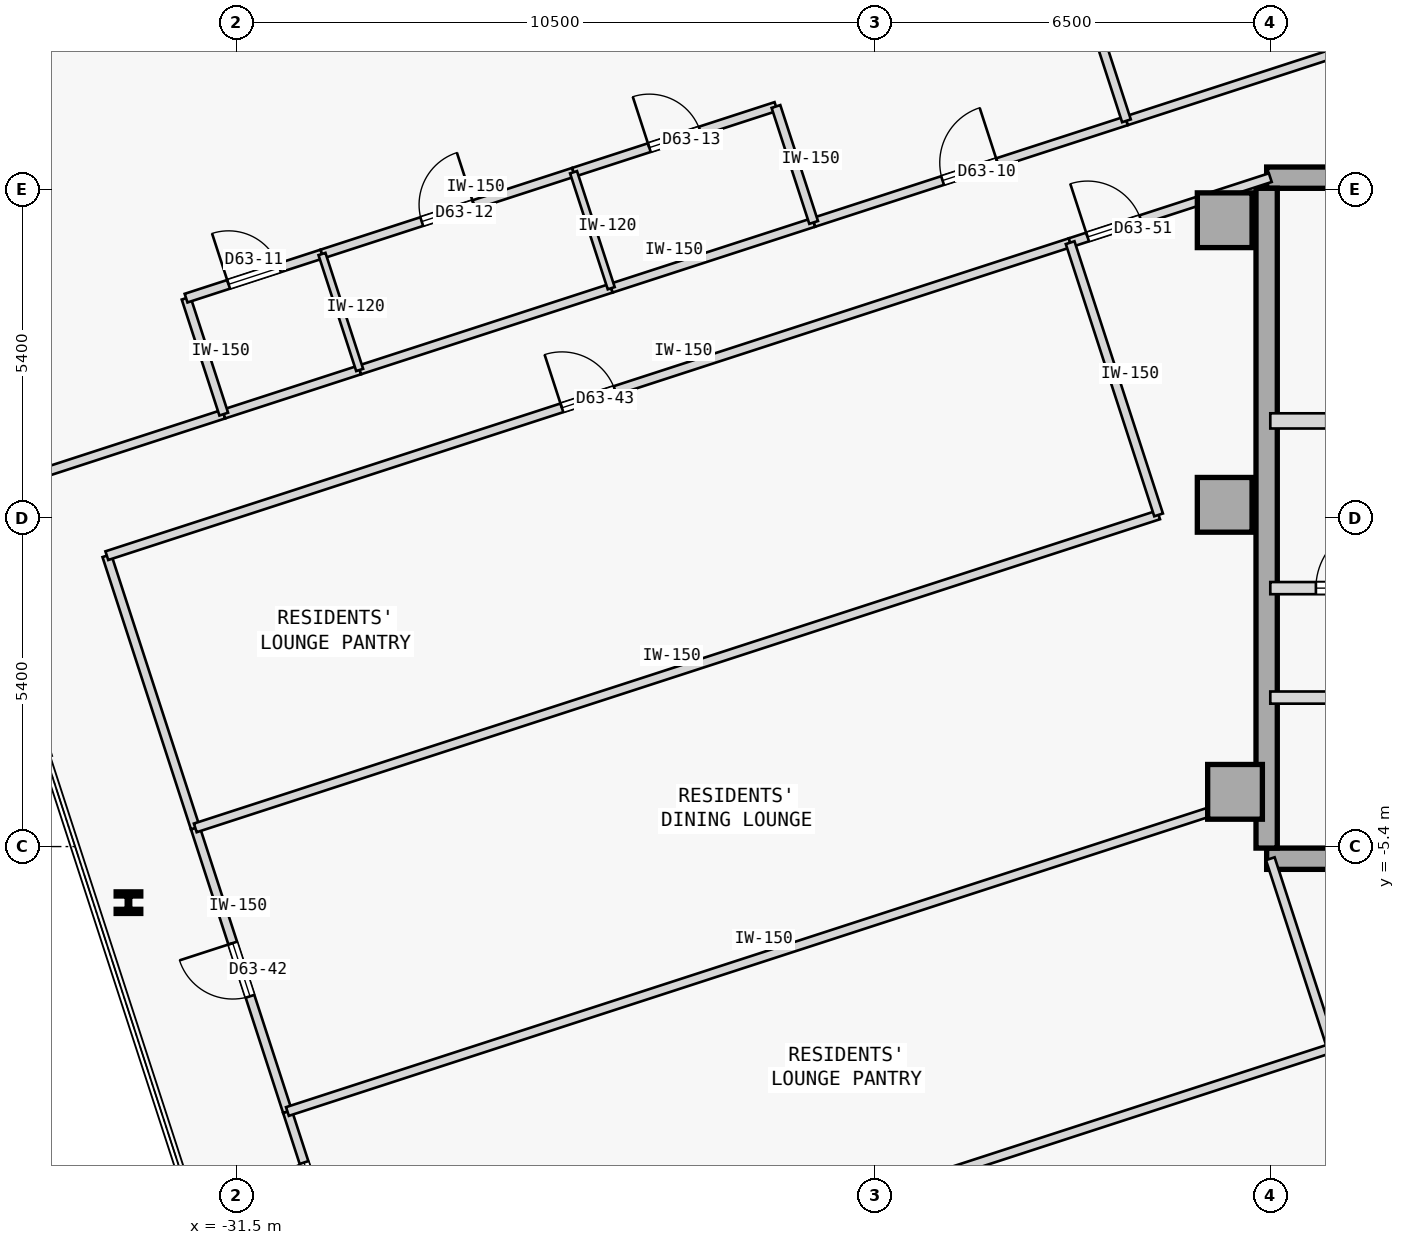
"""IFC4 building model, lengths in metres.
Left out: names, types, materials, properties, quantities, classifications, styles, units other than length and angle.
Written with IfcOpenShell. Run it as: python <this file> out.ifc"""

import sys

from ifc_helpers import new_model, si_unit, direction, frame, frame_2d, origin, origin_2d, place, context, subcontext, project, spatial, rectangle, i_section, extrude, element, fill, save


model = new_model("IFC4")
c1 = context("Model", 3, precision=1e-05, world=origin(), true_north=direction((0.0, 1.0)))
c2 = subcontext(c1, "Body", "Model", "MODEL_VIEW")
j1 = project(units=[si_unit("LENGTHUNIT", "METRE"), si_unit("PLANEANGLEUNIT", "RADIAN")], contexts=[c1])
p1 = place(None, origin())
s1 = spatial("IfcSite", under=j1, at=p1, CompositionType="ELEMENT")
p2 = place(p1, origin())
s2 = spatial("IfcBuilding", under=s1, at=p2, CompositionType="ELEMENT")
p3 = place(p2, frame((0.0, 0.0, 237.7)))
s3 = spatial("IfcBuildingStorey", under=s2, at=p3, CompositionType="ELEMENT", Elevation=237.7)
for number, where, z_axis, x_axis in (
    (1, (-15.25, 4.9, 0.0), (0.0, 0.0, 1.0), (1.0, 0.0, 0.0)),
    (2, (-15.25, 0.22, 0.0), (0.0, 0.0, 1.0), (1.0, 0.0, 0.0)),
    (3, (-15.08, -4.5, 0.0), (0.0, 0.0, 1.0), (1.0, 0.0, 0.0)),
):
    element("IfcColumn", number, at=place(p3, frame(where, z_axis=z_axis, x_axis=x_axis)), inside=s3, PredefinedType="COLUMN", context=c2, shape_type="SweptSolid", body=[
        extrude(rectangle(XDim=0.9, YDim=0.9, at=origin_2d()), origin(), (0.0, 0.0, 1.0), 3.35),
    ])
p4 = place(p3, frame((-14.56, 5.6, 0.0), z_axis=(0.0, 0.0, 1.0), x_axis=(1.0, 0.0, 0.0)))
e4 = element("IfcWall", 4, at=p4, inside=s3, PredefinedType="SHEAR", context=c2, shape_type="SweptSolid", body=[
    extrude(rectangle(XDim=11.41, YDim=0.35, at=frame_2d((5.705, 0.0))), origin(), (0.0, 0.0, 1.0), 3.125),
])
p5 = place(p3, frame((-14.56, -5.6, 0.0), z_axis=(0.0, 0.0, 1.0), x_axis=(1.0, 0.0, 0.0)))
e5 = element("IfcWall", 5, at=p5, inside=s3, PredefinedType="SHEAR", context=c2, shape_type="SweptSolid", body=[
    extrude(rectangle(XDim=10.86, YDim=0.35, at=frame_2d((5.43, 0.0))), origin(), (0.0, 0.0, 1.0), 3.125),
])
p6 = place(p3, frame((-14.56, -5.425, 0.0), z_axis=(0.0, 0.0, 1.0), x_axis=(0.0, 1.0, 0.0)))
e6 = element("IfcWall", 6, at=p6, inside=s3, PredefinedType="SHEAR", context=c2, shape_type="SweptSolid", body=[
    extrude(rectangle(XDim=10.85, YDim=0.35, at=frame_2d((5.425, 0.0))), origin(), (0.0, 0.0, 1.0), 3.125),
])
p7 = place(p3, frame((-33.278, -6.322, 0.0), z_axis=(0.0, 0.0, 1.0), x_axis=(1.0, 0.0, 0.0)))
e7 = element("IfcColumn", 7, at=p7, inside=s3, PredefinedType="COLUMN", context=c2, shape_type="SweptSolid", body=[
    extrude(i_section(OverallWidth=0.405, OverallDepth=0.355, WebThickness=0.042, FlangeThickness=0.068, FilletRadius=0.015, at=origin_2d()), origin(), (0.0, 0.0, 1.0), 3.35),
])
p8 = place(p3, frame((-14.5, 1.6, 0.0), z_axis=(0.0, 0.0, 1.0), x_axis=(1.0, 0.0, 0.0)))
e8 = element("IfcWall", 8, at=p8, inside=s3, PredefinedType="STANDARD", context=c2, shape_type="SweptSolid", body=[
    extrude(rectangle(XDim=3.6, YDim=0.25, at=frame_2d((1.8, 0.0))), origin(), (0.0, 0.0, 1.0), 3.125),
])
p9 = place(p8, frame((0.92, 0.0, 0.0)))
e9 = element("IfcOpeningElement", 9, at=p9, cuts=e8, PredefinedType="OPENING", context=c2, shape_type="SweptSolid", body=[
    extrude(rectangle(XDim=1.05, YDim=2.15, at=frame_2d((0.525, 1.075))), frame((0.0, 0.135, 0.0), z_axis=(0.0, -1.0, 0.0), x_axis=(1.0, 0.0, 0.0)), (0.0, 0.0, 1.0), 0.27),
])
p10 = place(p3, frame((-14.5, -1.15, 0.0), z_axis=(0.0, 0.0, 1.0), x_axis=(1.0, 0.0, 0.0)))
e10 = element("IfcWall", 10, at=p10, inside=s3, PredefinedType="STANDARD", context=c2, shape_type="SweptSolid", body=[
    extrude(rectangle(XDim=2.95, YDim=0.2, at=frame_2d((1.475, 0.0))), origin(), (0.0, 0.0, 1.0), 3.125),
])
p11 = place(p10, frame((0.75, 0.0, 0.0)))
e11 = element("IfcOpeningElement", 11, at=p11, cuts=e10, PredefinedType="OPENING", context=c2, shape_type="SweptSolid", body=[
    extrude(rectangle(XDim=1.05, YDim=2.18, at=frame_2d((0.525, 1.09))), frame((0.0, 0.11, 0.0), z_axis=(0.0, -1.0, 0.0), x_axis=(1.0, 0.0, 0.0)), (0.0, 0.0, 1.0), 0.22),
])
p12 = place(p3, frame((-14.5, -2.95, 0.0), z_axis=(0.0, 0.0, 1.0), x_axis=(1.0, 0.0, 0.0)))
e12 = element("IfcWall", 12, at=p12, inside=s3, PredefinedType="STANDARD", context=c2, shape_type="SweptSolid", body=[
    extrude(rectangle(XDim=10.8, YDim=0.2, at=frame_2d((5.4, 0.0))), origin(), (0.0, 0.0, 1.0), 3.125),
])
p13 = place(p12, frame((9.17, 0.0, 0.0)))
e13 = element("IfcOpeningElement", 13, at=p13, cuts=e12, PredefinedType="OPENING", context=c2, shape_type="SweptSolid", body=[
    extrude(rectangle(XDim=1.1, YDim=2.15, at=frame_2d((0.55, 1.075))), frame((0.0, 0.11, 0.0), z_axis=(0.0, -1.0, 0.0), x_axis=(1.0, 0.0, 0.0)), (0.0, 0.0, 1.0), 0.22),
])
p14 = place(p12, frame((3.86, 0.0, 0.0)))
e14 = element("IfcOpeningElement", 14, at=p14, cuts=e12, PredefinedType="OPENING", context=c2, shape_type="SweptSolid", body=[
    extrude(rectangle(XDim=0.92, YDim=2.15, at=frame_2d((0.46, 1.075))), frame((0.0, 0.11, 0.0), z_axis=(0.0, -1.0, 0.0), x_axis=(1.0, 0.0, 0.0)), (0.0, 0.0, 1.0), 0.22),
])
p15 = place(p3, frame((-36.012, 0.314, 0.0), z_axis=(0.0, 0.0, 1.0), x_axis=(0.951052710898, 0.309028705936, 0.0)))
e15 = element("IfcWall", 15, at=p15, inside=s3, PredefinedType="PARTITIONING", context=c2, shape_type="SweptSolid", body=[
    extrude(rectangle(XDim=4.523, YDim=0.15, at=frame_2d((2.261, 0.0))), origin(), (0.0, 0.0, 1.0), 3.125),
])
p16 = place(p3, frame((-22.01, 4.864, 0.0), z_axis=(0.0, 0.0, 1.0), x_axis=(0.951061595649, 0.309001361293, 0.0)))
e16 = element("IfcWall", 16, at=p16, inside=s3, PredefinedType="PARTITIONING", context=c2, shape_type="SweptSolid", body=[
    extrude(rectangle(XDim=5.409, YDim=0.15, at=frame_2d((2.705, 0.0))), origin(), (0.0, 0.0, 1.0), 3.125),
])
p17 = place(p16, frame((2.229, 0.0, 0.0)))
e17 = element("IfcOpeningElement", 17, at=p17, cuts=e16, PredefinedType="OPENING", context=c2, shape_type="SweptSolid", body=[
    extrude(rectangle(XDim=0.95, YDim=2.15, at=frame_2d((0.475, 1.075))), frame((0.0, 0.085, 0.0), z_axis=(0.0, -1.0, 0.0), x_axis=(1.0, 0.0, 0.0)), (0.0, 0.0, 1.0), 0.17),
])
p18 = place(p3, frame((-31.711, 1.712, 0.0), z_axis=(0.0, 0.0, 1.0), x_axis=(0.951076048914, 0.308956872689, 0.0)))
e18 = element("IfcWall", 18, at=p18, inside=s3, PredefinedType="PARTITIONING", context=c2, shape_type="SweptSolid", body=[
    extrude(rectangle(XDim=2.35, YDim=0.15, at=frame_2d((1.175, 0.0))), origin(), (0.0, 0.0, 1.0), 3.125),
])
p19 = place(p3, frame((-29.476, 2.438, 0.0), z_axis=(0.0, 0.0, 1.0), x_axis=(0.951057987102, 0.309012467661, 0.0)))
e19 = element("IfcWall", 19, at=p19, inside=s3, PredefinedType="PARTITIONING", context=c2, shape_type="SweptSolid", body=[
    extrude(rectangle(XDim=4.35, YDim=0.15, at=frame_2d((2.175, 0.0))), origin(), (0.0, 0.0, 1.0), 3.125),
])
p20 = place(p3, frame((-25.338, 3.782, 0.0), z_axis=(0.0, 0.0, 1.0), x_axis=(0.951055596592, 0.309019824916, 0.0)))
e20 = element("IfcWall", 20, at=p20, inside=s3, PredefinedType="PARTITIONING", context=c2, shape_type="SweptSolid", body=[
    extrude(rectangle(XDim=3.5, YDim=0.15, at=frame_2d((1.75, 0.0))), origin(), (0.0, 0.0, 1.0), 3.125),
])
p21 = place(p3, frame((-16.865, 6.535, 0.0), z_axis=(0.0, 0.0, 1.0), x_axis=(0.951049118272, 0.309039762222, 0.0)))
e21 = element("IfcWall", 21, at=p21, inside=s3, PredefinedType="PARTITIONING", context=c2, shape_type="SweptSolid", body=[
    extrude(rectangle(XDim=4.53, YDim=0.15, at=frame_2d((2.265, 0.0))), origin(), (0.0, 0.0, 1.0), 3.125),
])
p22 = place(p3, frame((-29.833, -12.311, 0.0), z_axis=(0.0, 0.0, 1.0), x_axis=(-0.309044953986, 0.951047431213, 0.0)))
e22 = element("IfcWall", 22, at=p22, inside=s3, PredefinedType="PARTITIONING", context=c2, shape_type="SweptSolid", body=[
    extrude(rectangle(XDim=2.685, YDim=0.15, at=frame_2d((1.343, 0.0))), origin(), (0.0, 0.0, 1.0), 3.125),
])
p23 = place(p22, frame((0.883, 0.0, 0.0)))
e23 = element("IfcOpeningElement", 23, at=p23, cuts=e22, PredefinedType="OPENING", context=c2, shape_type="SweptSolid", body=[
    extrude(rectangle(XDim=0.92, YDim=2.15, at=frame_2d((0.46, 1.075))), frame((0.0, 0.085, 0.0), z_axis=(0.0, -1.0, 0.0), x_axis=(1.0, 0.0, 0.0)), (0.0, 0.0, 1.0), 0.17),
])
p24 = place(p3, frame((-30.663, -9.757, 0.0), z_axis=(0.0, 0.0, 1.0), x_axis=(-0.309019653166, 0.951055652397, 0.0)))
e24 = element("IfcWall", 24, at=p24, inside=s3, PredefinedType="PARTITIONING", context=c2, shape_type="SweptSolid", body=[
    extrude(rectangle(XDim=4.904, YDim=0.15, at=frame_2d((2.452, 0.0))), origin(), (0.0, 0.0, 1.0), 3.125),
])
p25 = place(p24, frame((1.992, 0.0, 0.0)))
e25 = element("IfcOpeningElement", 25, at=p25, cuts=e24, PredefinedType="OPENING", context=c2, shape_type="SweptSolid", body=[
    extrude(rectangle(XDim=0.92, YDim=2.15, at=frame_2d((0.46, 1.075))), frame((0.0, 0.085, 0.0), z_axis=(0.0, -1.0, 0.0), x_axis=(1.0, 0.0, 0.0)), (0.0, 0.0, 1.0), 0.17),
])
p26 = place(p3, frame((-32.179, -5.093, 0.0), z_axis=(0.0, 0.0, 1.0), x_axis=(-0.309014532869, 0.951057316083, 0.0)))
e26 = element("IfcWall", 26, at=p26, inside=s3, PredefinedType="PARTITIONING", context=c2, shape_type="SweptSolid", body=[
    extrude(rectangle(XDim=4.707, YDim=0.15, at=frame_2d((2.354, 0.0))), origin(), (0.0, 0.0, 1.0), 3.125),
])
p27 = place(p3, frame((-33.633, -0.616, 0.0), z_axis=(0.0, 0.0, 1.0), x_axis=(0.951058192995, 0.309011833974, 0.0)))
e27 = element("IfcWall", 27, at=p27, inside=s3, PredefinedType="PARTITIONING", context=c2, shape_type="SweptSolid", body=[
    extrude(rectangle(XDim=16.657, YDim=0.15, at=frame_2d((8.329, 0.0))), origin(), (0.0, 0.0, 1.0), 3.125),
])
p28 = place(p27, frame((7.868, 0.0, 0.0)))
e28 = element("IfcOpeningElement", 28, at=p28, cuts=e27, PredefinedType="OPENING", context=c2, shape_type="SweptSolid", body=[
    extrude(rectangle(XDim=0.92, YDim=2.15, at=frame_2d((0.46, 1.075))), frame((0.0, 0.085, 0.0), z_axis=(0.0, -1.0, 0.0), x_axis=(1.0, 0.0, 0.0)), (0.0, 0.0, 1.0), 0.17),
])
p29 = place(p3, frame((-17.792, 4.531, 0.0), z_axis=(0.0, 0.0, 1.0), x_axis=(0.951047546178, 0.309044600193, 0.0)))
e29 = element("IfcWall", 29, at=p29, inside=s3, PredefinedType="PARTITIONING", context=c2, shape_type="SweptSolid", body=[
    extrude(rectangle(XDim=3.461, YDim=0.15, at=frame_2d((1.73, 0.0))), origin(), (0.0, 0.0, 1.0), 3.125),
])
p30 = place(p29, frame((0.302, 0.0, 0.0)))
e30 = element("IfcOpeningElement", 30, at=p30, cuts=e29, PredefinedType="OPENING", context=c2, shape_type="SweptSolid", body=[
    extrude(rectangle(XDim=0.92, YDim=2.15, at=frame_2d((0.46, 1.075))), frame((0.0, 0.085, 0.0), z_axis=(0.0, -1.0, 0.0), x_axis=(1.0, 0.0, 0.0)), (0.0, 0.0, 1.0), 0.17),
])
p31 = place(p3, frame((-31.711, 1.712, 0.0), z_axis=(0.0, 0.0, 1.0), x_axis=(-0.308948390121, 0.951078804433, 0.0)))
e31 = element("IfcWall", 31, at=p31, inside=s3, PredefinedType="PARTITIONING", context=c2, shape_type="SweptSolid", body=[
    extrude(rectangle(XDim=2.005, YDim=0.15, at=frame_2d((1.002, 0.0))), origin(), (0.0, 0.0, 1.0), 3.125),
])
p32 = place(p3, frame((-32.33, 3.619, 0.0), z_axis=(0.0, 0.0, 1.0), x_axis=(0.951066131077, 0.308987401554, 0.0)))
e32 = element("IfcWall", 32, at=p32, inside=s3, PredefinedType="PARTITIONING", context=c2, shape_type="SweptSolid", body=[
    extrude(rectangle(XDim=2.35, YDim=0.15, at=frame_2d((1.175, 0.0))), origin(), (0.0, 0.0, 1.0), 3.125),
])
p33 = place(p32, frame((0.735, 0.0, 0.0)))
e33 = element("IfcOpeningElement", 33, at=p33, cuts=e32, PredefinedType="OPENING", context=c2, shape_type="SweptSolid", body=[
    extrude(rectangle(XDim=0.88, YDim=2.15, at=frame_2d((0.44, 1.075))), frame((0.0, 0.085, 0.0), z_axis=(0.0, -1.0, 0.0), x_axis=(1.0, 0.0, 0.0)), (0.0, 0.0, 1.0), 0.17),
])
p34 = place(p3, frame((-30.095, 4.345, 0.0), z_axis=(0.0, 0.0, 1.0), x_axis=(0.951041492154, 0.309063230101, 0.0)))
e34 = element("IfcWall", 34, at=p34, inside=s3, PredefinedType="PARTITIONING", context=c2, shape_type="SweptSolid", body=[
    extrude(rectangle(XDim=4.35, YDim=0.15, at=frame_2d((2.175, 0.0))), origin(), (0.0, 0.0, 1.0), 3.125),
])
p35 = place(p34, frame((1.725, 0.0, 0.0)))
e35 = element("IfcOpeningElement", 35, at=p35, cuts=e34, PredefinedType="OPENING", context=c2, shape_type="SweptSolid", body=[
    extrude(rectangle(XDim=0.9, YDim=2.15, at=frame_2d((0.45, 1.075))), frame((0.0, 0.085, 0.0), z_axis=(0.0, -1.0, 0.0), x_axis=(1.0, 0.0, 0.0)), (0.0, 0.0, 1.0), 0.17),
])
p36 = place(p3, frame((-25.958, 5.689, 0.0), z_axis=(0.0, 0.0, 1.0), x_axis=(0.951076095932, 0.308956727951, 0.0)))
e36 = element("IfcWall", 36, at=p36, inside=s3, PredefinedType="PARTITIONING", context=c2, shape_type="SweptSolid", body=[
    extrude(rectangle(XDim=3.5, YDim=0.15, at=frame_2d((1.75, 0.0))), origin(), (0.0, 0.0, 1.0), 3.125),
])
p37 = place(p36, frame((1.31, 0.0, 0.0)))
e37 = element("IfcOpeningElement", 37, at=p37, cuts=e36, PredefinedType="OPENING", context=c2, shape_type="SweptSolid", body=[
    extrude(rectangle(XDim=0.88, YDim=2.15, at=frame_2d((0.44, 1.075))), frame((0.0, 0.085, 0.0), z_axis=(0.0, -1.0, 0.0), x_axis=(1.0, 0.0, 0.0)), (0.0, 0.0, 1.0), 0.17),
])
p38 = place(p3, frame((-22.01, 4.864, 0.0), z_axis=(0.0, 0.0, 1.0), x_axis=(-0.309058537449, 0.951043017129, 0.0)))
e38 = element("IfcWall", 38, at=p38, inside=s3, PredefinedType="PARTITIONING", context=c2, shape_type="SweptSolid", body=[
    extrude(rectangle(XDim=2.005, YDim=0.15, at=frame_2d((1.002, 0.0))), origin(), (0.0, 0.0, 1.0), 3.125),
])
p39 = place(p3, frame((-16.865, 6.535, 0.0), z_axis=(0.0, 0.0, 1.0), x_axis=(-0.309029230739, 0.951052540372, 0.0)))
e39 = element("IfcWall", 39, at=p39, inside=s3, PredefinedType="PARTITIONING", context=c2, shape_type="SweptSolid", body=[
    extrude(rectangle(XDim=7.284, YDim=0.15, at=frame_2d((3.642, 0.0))), origin(), (0.0, 0.0, 1.0), 3.125),
])
p40 = place(p3, frame((-29.476, 2.438, 0.0), z_axis=(0.0, 0.0, 1.0), x_axis=(-0.309058537449, 0.951043017129, 0.0)))
e40 = element("IfcWall", 40, at=p40, inside=s3, PredefinedType="PARTITIONING", context=c2, shape_type="SweptSolid", body=[
    extrude(rectangle(XDim=2.005, YDim=0.12, at=frame_2d((1.002, 0.0))), origin(), (0.0, 0.0, 1.0), 3.125),
])
p41 = place(p3, frame((-25.338, 3.782, 0.0), z_axis=(0.0, 0.0, 1.0), x_axis=(-0.309022749039, 0.951054646472, 0.0)))
e41 = element("IfcWall", 41, at=p41, inside=s3, PredefinedType="PARTITIONING", context=c2, shape_type="SweptSolid", body=[
    extrude(rectangle(XDim=2.005, YDim=0.12, at=frame_2d((1.002, 0.0))), origin(), (0.0, 0.0, 1.0), 3.125),
])
p42 = place(p3, frame((-31.208, -14.471, 0.0), z_axis=(0.0, 0.0, 1.0), x_axis=(0.951057753948, 0.309013185244, 0.0)))
e42 = element("IfcWall", 42, at=p42, inside=s3, PredefinedType="PARTITIONING", context=c2, shape_type="SweptSolid", body=[
    extrude(rectangle(XDim=18.632, YDim=0.15, at=frame_2d((9.316, 0.0))), origin(), (0.0, 0.0, 1.0), 3.125),
])
p43 = place(p3, frame((-30.663, -9.757, 0.0), z_axis=(0.0, 0.0, 1.0), x_axis=(0.951058192995, 0.309011833974, 0.0)))
e43 = element("IfcWall", 43, at=p43, inside=s3, PredefinedType="PARTITIONING", context=c2, shape_type="SweptSolid", body=[
    extrude(rectangle(XDim=16.657, YDim=0.15, at=frame_2d((8.329, 0.0))), origin(), (0.0, 0.0, 1.0), 3.125),
])
p44 = place(p3, frame((-13.488, -8.713, 0.0), z_axis=(0.0, 0.0, 1.0), x_axis=(-0.309082700143, 0.951035164687, 0.0)))
e44 = element("IfcWall", 44, at=p44, inside=s3, PredefinedType="PARTITIONING", context=c2, shape_type="SweptSolid", body=[
    extrude(rectangle(XDim=3.274, YDim=0.15, at=frame_2d((1.637, 0.0))), origin(), (0.0, 0.0, 1.0), 3.125),
])
p45 = place(p3, frame((-32.179, -5.093, 0.0), z_axis=(0.0, 0.0, 1.0), x_axis=(0.951053885426, 0.309025091239, 0.0)))
e45 = element("IfcWall", 45, at=p45, inside=s3, PredefinedType="PARTITIONING", context=c2, shape_type="SweptSolid", body=[
    extrude(rectangle(XDim=16.657, YDim=0.15, at=frame_2d((8.329, 0.0))), origin(), (0.0, 0.0, 1.0), 3.125),
])
p46 = place(p3, frame((-16.337, 0.054, 0.0), z_axis=(0.0, 0.0, 1.0), x_axis=(-0.309029776355, 0.951052363083, 0.0)))
e46 = element("IfcWall", 46, at=p46, inside=s3, PredefinedType="PARTITIONING", context=c2, shape_type="SweptSolid", body=[
    extrude(rectangle(XDim=4.707, YDim=0.15, at=frame_2d((2.354, 0.0))), origin(), (0.0, 0.0, 1.0), 3.125),
])
p47 = place(p11, origin())
e47 = element("IfcDoor", 47, at=p47, inside=s3, OperationType="SINGLE_SWING_RIGHT", PredefinedType="DOOR", context=c2, shape_type="SweptSolid", body=[
    extrude(rectangle(XDim=1.05, YDim=2.18, at=frame_2d((0.525, 1.09))), frame((0.0, 0.025, 0.0), z_axis=(0.0, -1.0, 0.0), x_axis=(1.0, 0.0, 0.0)), (0.0, 0.0, 1.0), 0.05),
])
fill(e11, e47)
p48 = place(p17, origin())
e48 = element("IfcDoor", 48, at=p48, inside=s3, OperationType="SINGLE_SWING_RIGHT", PredefinedType="DOOR", context=c2, shape_type="SweptSolid", body=[
    extrude(rectangle(XDim=0.95, YDim=2.15, at=frame_2d((0.475, 1.075))), frame((0.0, 0.025, 0.0), z_axis=(0.0, -1.0, 0.0), x_axis=(1.0, 0.0, 0.0)), (0.0, 0.0, 1.0), 0.05),
])
fill(e17, e48)
p49 = place(p33, origin())
e49 = element("IfcDoor", 49, at=p49, inside=s3, OperationType="SINGLE_SWING_LEFT", PredefinedType="DOOR", context=c2, shape_type="SweptSolid", body=[
    extrude(rectangle(XDim=0.88, YDim=2.15, at=frame_2d((0.44, 1.075))), frame((0.0, 0.025, 0.0), z_axis=(0.0, -1.0, 0.0), x_axis=(1.0, 0.0, 0.0)), (0.0, 0.0, 1.0), 0.05),
])
fill(e33, e49)
p50 = place(p35, origin())
e50 = element("IfcDoor", 50, at=p50, inside=s3, OperationType="SINGLE_SWING_RIGHT", PredefinedType="DOOR", context=c2, shape_type="SweptSolid", body=[
    extrude(rectangle(XDim=0.9, YDim=2.15, at=frame_2d((0.45, 1.075))), frame((0.0, 0.025, 0.0), z_axis=(0.0, -1.0, 0.0), x_axis=(1.0, 0.0, 0.0)), (0.0, 0.0, 1.0), 0.05),
])
fill(e35, e50)
p51 = place(p37, origin())
e51 = element("IfcDoor", 51, at=p51, inside=s3, OperationType="SINGLE_SWING_LEFT", PredefinedType="DOOR", context=c2, shape_type="SweptSolid", body=[
    extrude(rectangle(XDim=0.88, YDim=2.15, at=frame_2d((0.44, 1.075))), frame((0.0, 0.025, 0.0), z_axis=(0.0, -1.0, 0.0), x_axis=(1.0, 0.0, 0.0)), (0.0, 0.0, 1.0), 0.05),
])
fill(e37, e51)
p52 = place(p23, origin())
e52 = element("IfcDoor", 52, at=p52, inside=s3, OperationType="SINGLE_SWING_LEFT", PredefinedType="DOOR", context=c2, shape_type="SweptSolid", body=[
    extrude(rectangle(XDim=0.92, YDim=2.15, at=frame_2d((0.46, 1.075))), frame((0.0, 0.025, 0.0), z_axis=(0.0, -1.0, 0.0), x_axis=(1.0, 0.0, 0.0)), (0.0, 0.0, 1.0), 0.05),
])
fill(e23, e52)
p53 = place(p25, origin())
e53 = element("IfcDoor", 53, at=p53, inside=s3, OperationType="SINGLE_SWING_RIGHT", PredefinedType="DOOR", context=c2, shape_type="SweptSolid", body=[
    extrude(rectangle(XDim=0.92, YDim=2.15, at=frame_2d((0.46, 1.075))), frame((0.0, 0.025, 0.0), z_axis=(0.0, -1.0, 0.0), x_axis=(1.0, 0.0, 0.0)), (0.0, 0.0, 1.0), 0.05),
])
fill(e25, e53)
p54 = place(p28, origin())
e54 = element("IfcDoor", 54, at=p54, inside=s3, OperationType="SINGLE_SWING_LEFT", PredefinedType="DOOR", context=c2, shape_type="SweptSolid", body=[
    extrude(rectangle(XDim=0.92, YDim=2.15, at=frame_2d((0.46, 1.075))), frame((0.0, 0.025, 0.0), z_axis=(0.0, -1.0, 0.0), x_axis=(1.0, 0.0, 0.0)), (0.0, 0.0, 1.0), 0.05),
])
fill(e28, e54)
p55 = place(p30, origin())
e55 = element("IfcDoor", 55, at=p55, inside=s3, OperationType="SINGLE_SWING_LEFT", PredefinedType="DOOR", context=c2, shape_type="SweptSolid", body=[
    extrude(rectangle(XDim=0.92, YDim=2.15, at=frame_2d((0.46, 1.075))), frame((0.0, 0.025, 0.0), z_axis=(0.0, -1.0, 0.0), x_axis=(1.0, 0.0, 0.0)), (0.0, 0.0, 1.0), 0.05),
])
fill(e30, e55)
save(model, sys.argv[1])
